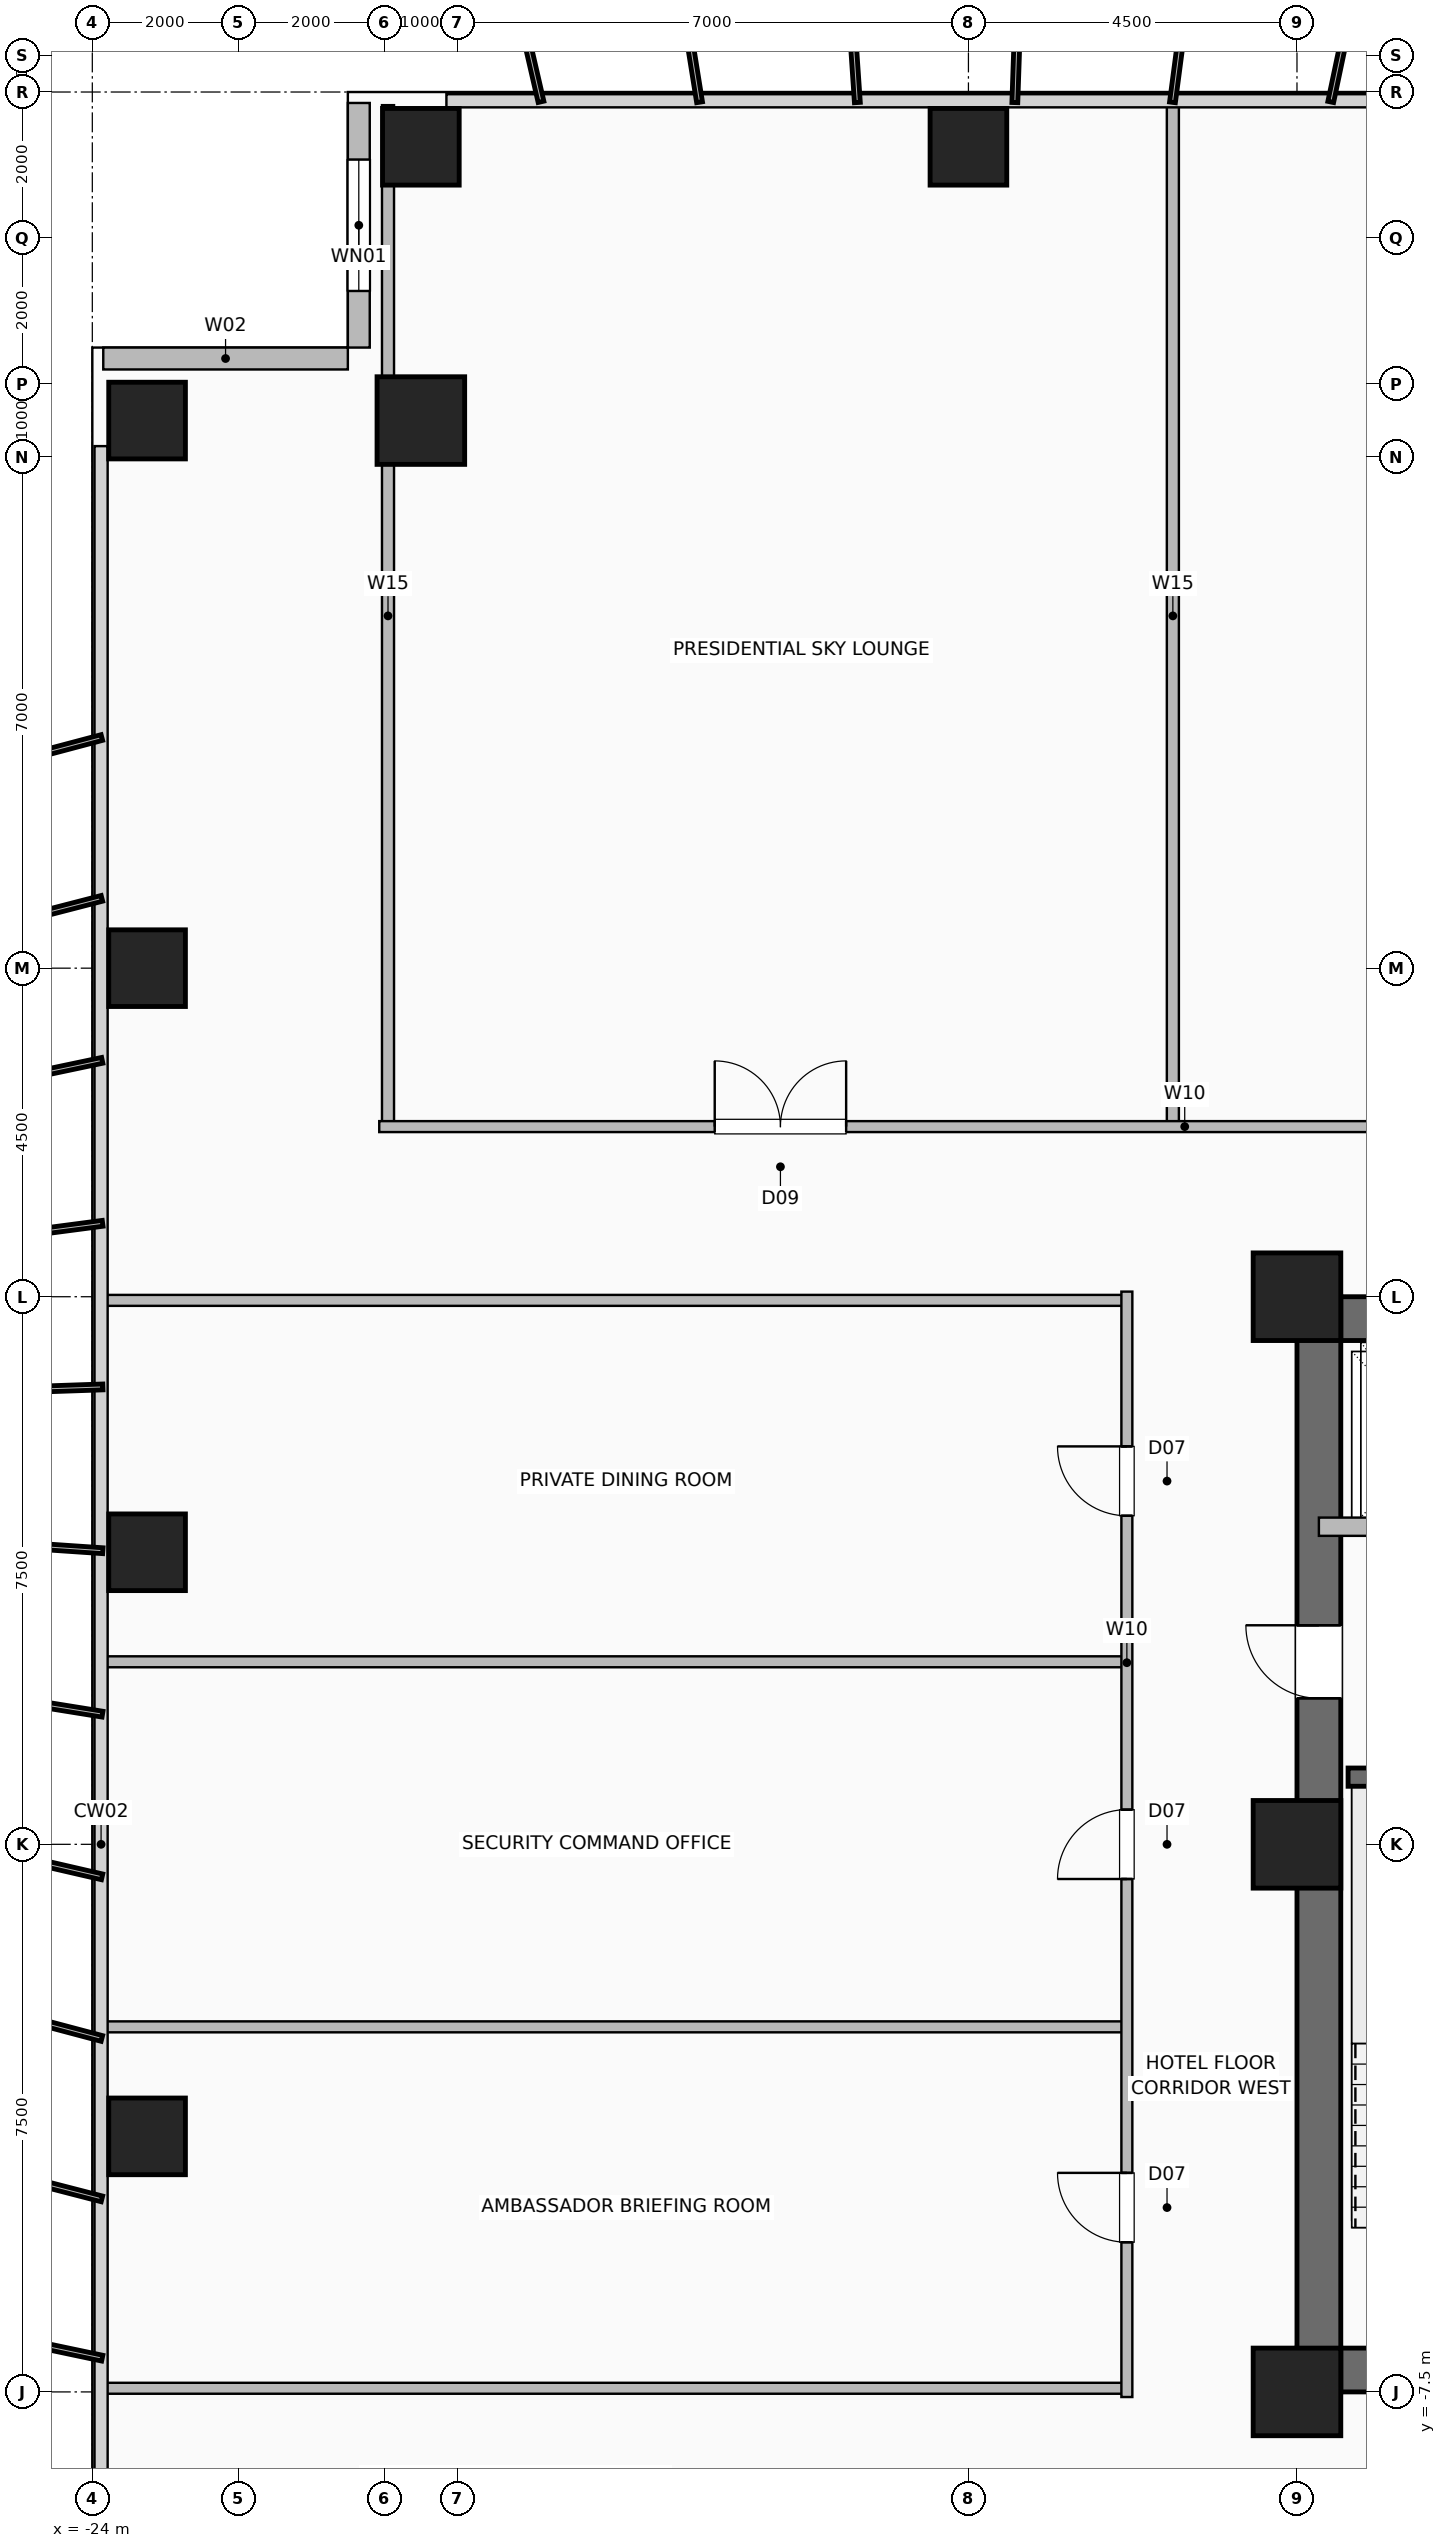
"""IFC4 building model, lengths in metres.
Left out: names, types, materials, properties, quantities, classifications, styles, units other than length and angle.
Written with IfcOpenShell. Run it as: python <this file> out.ifc"""

import sys

from ifc_helpers import new_model, si_unit, direction, frame, frame_2d, origin, origin_2d, place, context, subcontext, project, spatial, rectangle, hollow_rectangle, extrude, element, fill, save


model = new_model("IFC4")
c1 = context("Model", 3, precision=1e-05, world=origin(), true_north=direction((0.0, 1.0)))
c2 = subcontext(c1, "Body", "Model", "MODEL_VIEW")
j1 = project(units=[si_unit("LENGTHUNIT", "METRE"), si_unit("PLANEANGLEUNIT", "RADIAN")], contexts=[c1])
p1 = place(None, origin())
s1 = spatial("IfcSite", under=j1, at=p1, CompositionType="ELEMENT")
p2 = place(p1, origin())
s2 = spatial("IfcBuilding", under=s1, at=p2, CompositionType="ELEMENT")
p3 = place(p2, frame((0.0, 0.0, 79.5)))
s3 = spatial("IfcBuildingStorey", under=s2, at=p3, CompositionType="ELEMENT", Elevation=79.5)
for number, where, z_axis, x_axis in (
    (1, (-7.5, -7.5, 0.0), (0.0, 0.0, 1.0), (1.0, 0.0, 0.0)),
    (2, (-7.5, 7.5, 0.0), (0.0, 0.0, 1.0), (1.0, 0.0, 0.0)),
    (3, (-7.5, 0.0, 0.0), (0.0, 0.0, 1.0), (1.0, 0.0, 0.0)),
):
    element("IfcColumn", number, at=place(p3, frame(where, z_axis=z_axis, x_axis=x_axis)), inside=s3, PredefinedType="COLUMN", context=c2, shape_type="SweptSolid", body=[
        extrude(hollow_rectangle(XDim=1.2, YDim=1.2, WallThickness=0.055, at=origin_2d()), origin(), (0.0, 0.0, 1.0), 3.5),
    ])
for number, where, z_axis, x_axis in (
    (4, (-19.5, 23.25, 0.0), (0.0, 0.0, 1.0), (1.0, 0.0, 0.0)),
    (5, (-12.0, 23.25, 0.0), (0.0, 0.0, 1.0), (1.0, 0.0, 0.0)),
    (6, (-23.25, -4.0, 0.0), (0.0, 0.0, 1.0), (1.0, 0.0, 0.0)),
    (7, (-23.25, 4.0, 0.0), (0.0, 0.0, 1.0), (1.0, 0.0, 0.0)),
    (8, (-23.25, 12.0, 0.0), (0.0, 0.0, 1.0), (1.0, 0.0, 0.0)),
    (9, (-23.25, 19.5, 0.0), (0.0, 0.0, 1.0), (1.0, 0.0, 0.0)),
):
    element("IfcColumn", number, at=place(p3, frame(where, z_axis=z_axis, x_axis=x_axis)), inside=s3, PredefinedType="COLUMN", context=c2, shape_type="SweptSolid", body=[
        extrude(hollow_rectangle(XDim=1.05, YDim=1.05, WallThickness=0.05, at=origin_2d()), origin(), (0.0, 0.0, 1.0), 3.5),
    ])
p4 = place(p3, frame((-19.5, 19.5, 0.0), z_axis=(0.0, 0.0, 1.0), x_axis=(1.0, 0.0, 0.0)))
e10 = element("IfcColumn", 10, at=p4, inside=s3, PredefinedType="COLUMN", context=c2, shape_type="SweptSolid", body=[
    extrude(hollow_rectangle(XDim=1.2, YDim=1.2, WallThickness=0.055, at=origin_2d()), origin(), (0.0, 0.0, 1.0), 3.5),
])
p5 = place(p3, frame((-20.35, 23.85, 0.0), z_axis=(0.0, 0.0, 1.0), x_axis=(0.0, -1.0, 0.0)))
e11 = element("IfcWall", 11, at=p5, inside=s3, PredefinedType="SOLIDWALL", context=c2, shape_type="SweptSolid", body=[
    extrude(rectangle(XDim=3.35, YDim=0.3, at=frame_2d((1.675, 0.0))), origin(), (0.0, 0.0, 1.0), 3.15),
])
p6 = place(p5, frame((0.775, 0.0, 0.9)))
e12 = element("IfcOpeningElement", 12, at=p6, cuts=e11, PredefinedType="OPENING", context=c2, shape_type="SweptSolid", body=[
    extrude(rectangle(XDim=1.8, YDim=1.8, at=frame_2d((0.9, 0.9))), frame((0.0, 0.16, 0.0), z_axis=(0.0, -1.0, 0.0), x_axis=(1.0, 0.0, 0.0)), (0.0, 0.0, 1.0), 0.32),
])
p7 = place(p3, frame((-23.85, 20.35, 0.0), z_axis=(0.0, 0.0, 1.0), x_axis=(1.0, 0.0, 0.0)))
e13 = element("IfcWall", 13, at=p7, inside=s3, PredefinedType="SOLIDWALL", context=c2, shape_type="SweptSolid", body=[
    extrude(rectangle(XDim=3.35, YDim=0.3, at=frame_2d((1.675, 0.0))), origin(), (0.0, 0.0, 1.0), 3.15),
])
p8 = place(p3, frame((-7.5, -7.2, 0.0), z_axis=(0.0, 0.0, 1.0), x_axis=(1.0, 0.0, 0.0)))
e14 = element("IfcWall", 14, at=p8, inside=s3, PredefinedType="SHEAR", context=c2, shape_type="SweptSolid", body=[
    extrude(rectangle(XDim=15.0, YDim=0.6, at=frame_2d((7.5, 0.0))), origin(), (0.0, 0.0, 1.0), 3.15),
])
p9 = place(p8, frame((1.55, 0.0, 0.0)))
e15 = element("IfcOpeningElement", 15, at=p9, cuts=e14, PredefinedType="OPENING", context=c2, shape_type="SweptSolid", body=[
    extrude(rectangle(XDim=1.05, YDim=2.08, at=frame_2d((0.525, 1.04))), frame((0.0, 0.31, 0.0), z_axis=(0.0, -1.0, 0.0), x_axis=(1.0, 0.0, 0.0)), (0.0, 0.0, 1.0), 0.62),
])
p10 = place(p8, frame((12.4, 0.0, 0.0)))
e16 = element("IfcOpeningElement", 16, at=p10, cuts=e14, PredefinedType="OPENING", context=c2, shape_type="SweptSolid", body=[
    extrude(rectangle(XDim=1.05, YDim=2.08, at=frame_2d((0.525, 1.04))), frame((0.0, 0.31, 0.0), z_axis=(0.0, -1.0, 0.0), x_axis=(1.0, 0.0, 0.0)), (0.0, 0.0, 1.0), 0.62),
])
p11 = place(p8, frame((4.64, 0.0, 0.0)))
e17 = element("IfcOpeningElement", 17, at=p11, cuts=e14, PredefinedType="OPENING", context=c2, shape_type="SweptSolid", body=[
    extrude(rectangle(XDim=1.1, YDim=2.2, at=frame_2d((0.55, 1.1))), frame((0.0, 0.31, 0.0), z_axis=(0.0, -1.0, 0.0), x_axis=(1.0, 0.0, 0.0)), (0.0, 0.0, 1.0), 0.62),
])
p12 = place(p8, frame((6.52, 0.0, 0.0)))
e18 = element("IfcOpeningElement", 18, at=p12, cuts=e14, PredefinedType="OPENING", context=c2, shape_type="SweptSolid", body=[
    extrude(rectangle(XDim=1.1, YDim=2.2, at=frame_2d((0.55, 1.1))), frame((0.0, 0.31, 0.0), z_axis=(0.0, -1.0, 0.0), x_axis=(1.0, 0.0, 0.0)), (0.0, 0.0, 1.0), 0.62),
])
p13 = place(p8, frame((8.4, 0.0, 0.0)))
e19 = element("IfcOpeningElement", 19, at=p13, cuts=e14, PredefinedType="OPENING", context=c2, shape_type="SweptSolid", body=[
    extrude(rectangle(XDim=1.1, YDim=2.2, at=frame_2d((0.55, 1.1))), frame((0.0, 0.31, 0.0), z_axis=(0.0, -1.0, 0.0), x_axis=(1.0, 0.0, 0.0)), (0.0, 0.0, 1.0), 0.62),
])
p14 = place(p3, frame((-7.5, 7.2, 0.0), z_axis=(0.0, 0.0, 1.0), x_axis=(1.0, 0.0, 0.0)))
e20 = element("IfcWall", 20, at=p14, inside=s3, PredefinedType="SHEAR", context=c2, shape_type="SweptSolid", body=[
    extrude(rectangle(XDim=15.0, YDim=0.6, at=frame_2d((7.5, 0.0))), origin(), (0.0, 0.0, 1.0), 3.15),
])
p15 = place(p3, frame((-7.2, -7.5, 0.0), z_axis=(0.0, 0.0, 1.0), x_axis=(0.0, 1.0, 0.0)))
e21 = element("IfcWall", 21, at=p15, inside=s3, PredefinedType="SHEAR", context=c2, shape_type="SweptSolid", body=[
    extrude(rectangle(XDim=15.0, YDim=0.6, at=frame_2d((7.5, 0.0))), origin(), (0.0, 0.0, 1.0), 3.15),
])
p16 = place(p15, frame((9.5, 0.0, 0.0)))
e22 = element("IfcOpeningElement", 22, at=p16, cuts=e21, PredefinedType="OPENING", context=c2, shape_type="SweptSolid", body=[
    extrude(rectangle(XDim=1.0, YDim=2.08, at=frame_2d((0.5, 1.04))), frame((0.0, 0.31, 0.0), z_axis=(0.0, -1.0, 0.0), x_axis=(1.0, 0.0, 0.0)), (0.0, 0.0, 1.0), 0.62),
])
p17 = place(p3, frame((-6.8, 0.92, 0.0), z_axis=(0.0, 0.0, 1.0), x_axis=(1.0, 0.0, 0.0)))
e23 = element("IfcWall", 23, at=p17, inside=s3, PredefinedType="SHEAR", context=c2, shape_type="SweptSolid", body=[
    extrude(rectangle(XDim=3.33, YDim=0.25, at=frame_2d((1.665, 0.0))), origin(), (0.0, 0.0, 1.0), 3.15),
])
p18 = place(p3, frame((-7.2, 4.35, 0.0), z_axis=(0.0, 0.0, 1.0), x_axis=(1.0, 0.0, 0.0)))
e24 = element("IfcWall", 24, at=p18, inside=s3, PredefinedType="SHEAR", context=c2, shape_type="SweptSolid", body=[
    extrude(rectangle(XDim=2.7, YDim=0.25, at=frame_2d((1.35, 0.0))), origin(), (0.0, 0.0, 1.0), 3.15),
])
p19 = place(p18, frame((0.75, 0.0, 0.0)))
e25 = element("IfcOpeningElement", 25, at=p19, cuts=e24, PredefinedType="OPENING", context=c2, shape_type="SweptSolid", body=[
    extrude(rectangle(XDim=1.2, YDim=2.2, at=frame_2d((0.6, 1.1))), frame((0.0, 0.135, 0.0), z_axis=(0.0, -1.0, 0.0), x_axis=(1.0, 0.0, 0.0)), (0.0, 0.0, 1.0), 0.27),
])
for number, where, z_axis, x_axis in (
    (26, (-19.95, 9.83, 0.0), (0.0, 0.0, 1.0), (0.0, 1.0, 0.0)),
    (27, (-9.2, 9.83, 0.0), (0.0, 0.0, 1.0), (0.0, 1.0, 0.0)),
):
    element("IfcWall", number, at=place(p3, frame(where, z_axis=z_axis, x_axis=x_axis)), inside=s3, PredefinedType="PLUMBINGWALL", context=c2, shape_type="SweptSolid", body=[
        extrude(rectangle(XDim=13.99, YDim=0.165, at=frame_2d((6.995, 0.0))), origin(), (0.0, 0.0, 1.0), 3.15),
    ])
p20 = place(p3, frame((-20.07, 9.83, 0.0), z_axis=(0.0, 0.0, 1.0), x_axis=(1.0, 0.0, 0.0)))
e28 = element("IfcWall", 28, at=p20, inside=s3, PredefinedType="PARTITIONING", context=c2, shape_type="SweptSolid", body=[
    extrude(rectangle(XDim=40.14, YDim=0.15, at=frame_2d((20.07, 0.0))), origin(), (0.0, 0.0, 1.0), 3.15),
])
p21 = place(p20, frame((4.595, 0.0, 0.0)))
e29 = element("IfcOpeningElement", 29, at=p21, cuts=e28, PredefinedType="OPENING", context=c2, shape_type="SweptSolid", body=[
    extrude(rectangle(XDim=1.8, YDim=2.08, at=frame_2d((0.9, 1.04))), frame((0.0, 0.085, 0.0), z_axis=(0.0, -1.0, 0.0), x_axis=(1.0, 0.0, 0.0)), (0.0, 0.0, 1.0), 0.17),
])
p22 = place(p20, frame((15.67, 0.0, 0.0)))
e30 = element("IfcOpeningElement", 30, at=p22, cuts=e28, PredefinedType="OPENING", context=c2, shape_type="SweptSolid", body=[
    extrude(rectangle(XDim=1.8, YDim=2.08, at=frame_2d((0.9, 1.04))), frame((0.0, 0.085, 0.0), z_axis=(0.0, -1.0, 0.0), x_axis=(1.0, 0.0, 0.0)), (0.0, 0.0, 1.0), 0.17),
])
p23 = place(p20, frame((25.595, 0.0, 0.0)))
e31 = element("IfcOpeningElement", 31, at=p23, cuts=e28, PredefinedType="OPENING", context=c2, shape_type="SweptSolid", body=[
    extrude(rectangle(XDim=0.95, YDim=2.06, at=frame_2d((0.475, 1.03))), frame((0.0, 0.085, 0.0), z_axis=(0.0, -1.0, 0.0), x_axis=(1.0, 0.0, 0.0)), (0.0, 0.0, 1.0), 0.17),
])
p24 = place(p20, frame((33.245, 0.0, 0.0)))
e32 = element("IfcOpeningElement", 32, at=p24, cuts=e28, PredefinedType="OPENING", context=c2, shape_type="SweptSolid", body=[
    extrude(rectangle(XDim=0.95, YDim=2.06, at=frame_2d((0.475, 1.03))), frame((0.0, 0.085, 0.0), z_axis=(0.0, -1.0, 0.0), x_axis=(1.0, 0.0, 0.0)), (0.0, 0.0, 1.0), 0.17),
])
p25 = place(p20, frame((38.37, 0.0, 0.0)))
e33 = element("IfcOpeningElement", 33, at=p25, cuts=e28, PredefinedType="OPENING", context=c2, shape_type="SweptSolid", body=[
    extrude(rectangle(XDim=0.85, YDim=2.05, at=frame_2d((0.425, 1.025))), frame((0.0, 0.085, 0.0), z_axis=(0.0, -1.0, 0.0), x_axis=(1.0, 0.0, 0.0)), (0.0, 0.0, 1.0), 0.17),
])
for number, where, z_axis, x_axis in (
    (34, (-23.82, -7.45, 0.0), (0.0, 0.0, 1.0), (1.0, 0.0, 0.0)),
    (35, (-23.82, -2.5, 0.0), (0.0, 0.0, 1.0), (1.0, 0.0, 0.0)),
    (36, (-23.82, 2.5, 0.0), (0.0, 0.0, 1.0), (1.0, 0.0, 0.0)),
    (37, (-23.82, 7.45, 0.0), (0.0, 0.0, 1.0), (1.0, 0.0, 0.0)),
):
    element("IfcWall", number, at=place(p3, frame(where, z_axis=z_axis, x_axis=x_axis)), inside=s3, PredefinedType="PARTITIONING", context=c2, shape_type="SweptSolid", body=[
        extrude(rectangle(XDim=13.99, YDim=0.15, at=frame_2d((6.995, 0.0))), origin(), (0.0, 0.0, 1.0), 3.15),
    ])
p26 = place(p3, frame((-9.83, -7.57, 0.0), z_axis=(0.0, 0.0, 1.0), x_axis=(0.0, 1.0, 0.0)))
e38 = element("IfcWall", 38, at=p26, inside=s3, PredefinedType="PARTITIONING", context=c2, shape_type="SweptSolid", body=[
    extrude(rectangle(XDim=15.14, YDim=0.15, at=frame_2d((7.57, 0.0))), origin(), (0.0, 0.0, 1.0), 3.15),
])
p27 = place(p26, frame((2.12, 0.0, 0.0)))
e39 = element("IfcOpeningElement", 39, at=p27, cuts=e38, PredefinedType="OPENING", context=c2, shape_type="SweptSolid", body=[
    extrude(rectangle(XDim=0.95, YDim=2.06, at=frame_2d((0.475, 1.03))), frame((0.0, 0.085, 0.0), z_axis=(0.0, -1.0, 0.0), x_axis=(1.0, 0.0, 0.0)), (0.0, 0.0, 1.0), 0.17),
])
p28 = place(p26, frame((7.095, 0.0, 0.0)))
e40 = element("IfcOpeningElement", 40, at=p28, cuts=e38, PredefinedType="OPENING", context=c2, shape_type="SweptSolid", body=[
    extrude(rectangle(XDim=0.95, YDim=2.06, at=frame_2d((0.475, 1.03))), frame((0.0, 0.085, 0.0), z_axis=(0.0, -1.0, 0.0), x_axis=(1.0, 0.0, 0.0)), (0.0, 0.0, 1.0), 0.17),
])
p29 = place(p26, frame((12.07, 0.0, 0.0)))
e41 = element("IfcOpeningElement", 41, at=p29, cuts=e38, PredefinedType="OPENING", context=c2, shape_type="SweptSolid", body=[
    extrude(rectangle(XDim=0.95, YDim=2.06, at=frame_2d((0.475, 1.03))), frame((0.0, 0.085, 0.0), z_axis=(0.0, -1.0, 0.0), x_axis=(1.0, 0.0, 0.0)), (0.0, 0.0, 1.0), 0.17),
])
p30 = place(p6, origin())
e42 = element("IfcWindow", 42, at=p30, inside=s3, PartitioningType="SINGLE_PANEL", PredefinedType="WINDOW", context=c2, shape_type="SweptSolid", body=[
    extrude(rectangle(XDim=1.8, YDim=1.8, at=frame_2d((0.9, 0.9))), frame((0.0, 0.03, 0.0), z_axis=(0.0, -1.0, 0.0), x_axis=(1.0, 0.0, 0.0)), (0.0, 0.0, 1.0), 0.06),
])
fill(e12, e42)
p31 = place(p16, origin())
e43 = element("IfcDoor", 43, at=p31, inside=s3, OperationType="SINGLE_SWING_RIGHT", PredefinedType="DOOR", context=c2, shape_type="SweptSolid", body=[
    extrude(rectangle(XDim=1.0, YDim=2.08, at=frame_2d((0.5, 1.04))), frame((0.0, 0.025, 0.0), z_axis=(0.0, -1.0, 0.0), x_axis=(1.0, 0.0, 0.0)), (0.0, 0.0, 1.0), 0.05),
])
fill(e22, e43)
p32 = place(p21, origin())
e44 = element("IfcDoor", 44, at=p32, inside=s3, OperationType="DOUBLE_DOOR_SINGLE_SWING", PredefinedType="DOOR", context=c2, shape_type="SweptSolid", body=[
    extrude(rectangle(XDim=1.8, YDim=2.08, at=frame_2d((0.9, 1.04))), frame((0.0, 0.025, 0.0), z_axis=(0.0, -1.0, 0.0), x_axis=(1.0, 0.0, 0.0)), (0.0, 0.0, 1.0), 0.05),
])
fill(e29, e44)
p33 = place(p27, origin())
e45 = element("IfcDoor", 45, at=p33, inside=s3, OperationType="SINGLE_SWING_RIGHT", PredefinedType="DOOR", context=c2, shape_type="SweptSolid", body=[
    extrude(rectangle(XDim=0.95, YDim=2.06, at=frame_2d((0.475, 1.03))), frame((0.0, 0.025, 0.0), z_axis=(0.0, -1.0, 0.0), x_axis=(1.0, 0.0, 0.0)), (0.0, 0.0, 1.0), 0.05),
])
fill(e39, e45)
p34 = place(p28, origin())
e46 = element("IfcDoor", 46, at=p34, inside=s3, OperationType="SINGLE_SWING_LEFT", PredefinedType="DOOR", context=c2, shape_type="SweptSolid", body=[
    extrude(rectangle(XDim=0.95, YDim=2.06, at=frame_2d((0.475, 1.03))), frame((0.0, 0.025, 0.0), z_axis=(0.0, -1.0, 0.0), x_axis=(1.0, 0.0, 0.0)), (0.0, 0.0, 1.0), 0.05),
])
fill(e40, e46)
p35 = place(p29, origin())
e47 = element("IfcDoor", 47, at=p35, inside=s3, OperationType="SINGLE_SWING_RIGHT", PredefinedType="DOOR", context=c2, shape_type="SweptSolid", body=[
    extrude(rectangle(XDim=0.95, YDim=2.06, at=frame_2d((0.475, 1.03))), frame((0.0, 0.025, 0.0), z_axis=(0.0, -1.0, 0.0), x_axis=(1.0, 0.0, 0.0)), (0.0, 0.0, 1.0), 0.05),
])
fill(e41, e47)
save(model, sys.argv[1])
